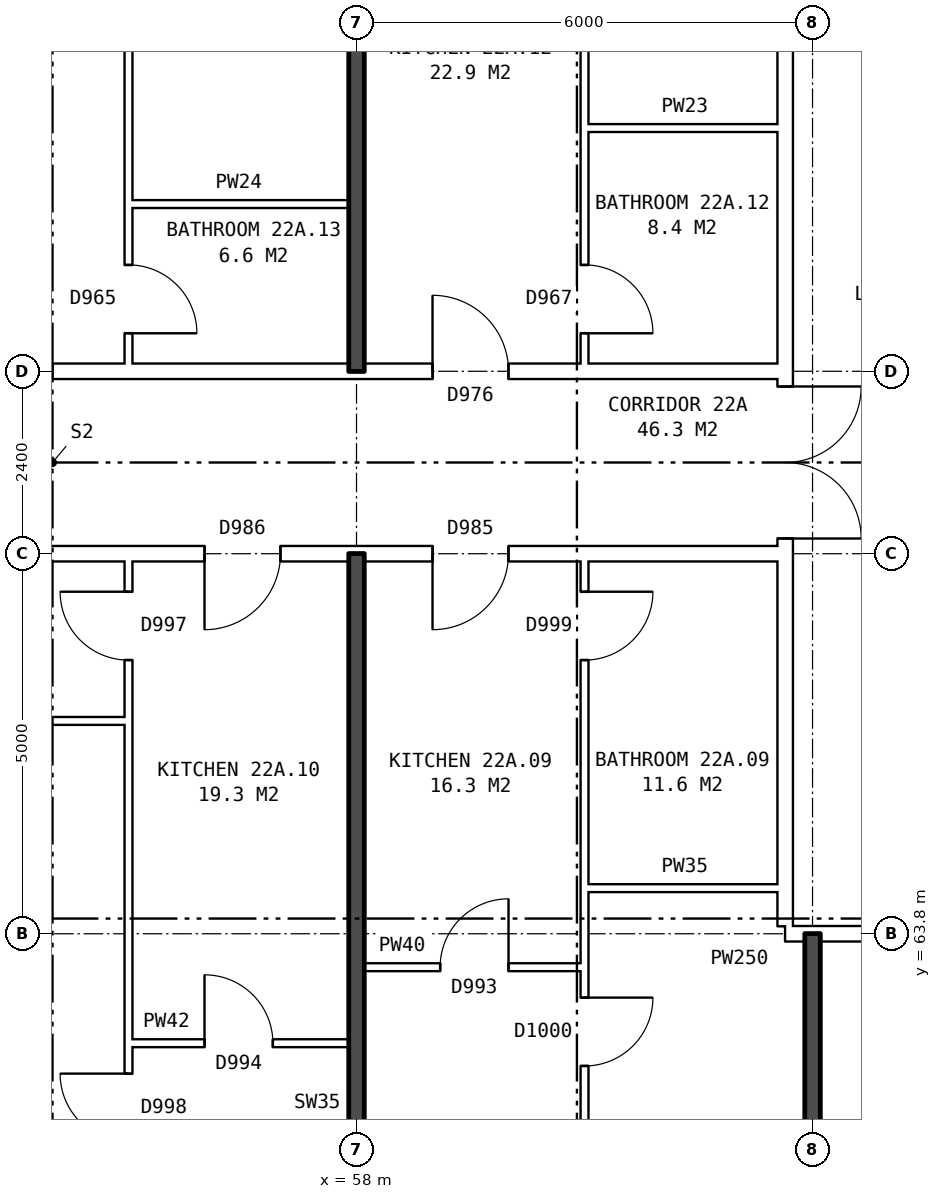
"""IFC4 building model, lengths in metres.
Left out: names, types, materials, properties, quantities, classifications, styles, units other than length and angle.
Written with IfcOpenShell. Run it as: python <this file> out.ifc"""

import sys

from ifc_helpers import new_model, si_unit, direction, frame, frame_2d, origin, place, context, subcontext, project, spatial, rectangle, extrude, element, fill, save


model = new_model("IFC4")
c1 = context("Model", 3, precision=1e-05, world=origin(), true_north=direction((0.0, 1.0)))
c2 = subcontext(c1, "Body", "Model", "MODEL_VIEW")
j1 = project(units=[si_unit("LENGTHUNIT", "METRE"), si_unit("PLANEANGLEUNIT", "RADIAN")], contexts=[c1])
p1 = place(None, origin())
s1 = spatial("IfcSite", under=j1, at=p1, CompositionType="ELEMENT")
p2 = place(p1, origin())
s2 = spatial("IfcBuilding", under=s1, at=p2, CompositionType="ELEMENT")
p3 = place(p2, frame((0.0, 0.0, 80.9)))
s3 = spatial("IfcBuildingStorey", under=s2, at=p3, CompositionType="ELEMENT", Elevation=80.9)
p4 = place(p3, frame((63.64, 63.9, 0.0), z_axis=(0.0, 0.0, 1.0), x_axis=(0.0, 1.0, 0.0)))
e1 = element("IfcWall", 1, at=p4, inside=s3, PredefinedType="PARTITIONING", context=c2, shape_type="SweptSolid", body=[
    extrude(rectangle(XDim=12.2, YDim=0.2, at=frame_2d((6.1, 0.0))), origin(), (0.0, 0.0, 1.0), 2.85),
])
p5 = place(p4, frame((5.1, 0.0, 0.0)))
e2 = element("IfcOpeningElement", 2, at=p5, cuts=e1, PredefinedType="OPENING", context=c2, shape_type="SweptSolid", body=[
    extrude(rectangle(XDim=2.0, YDim=2.1, at=frame_2d((1.0, 1.05))), frame((0.0, 0.11, 0.0), z_axis=(0.0, -1.0, 0.0), x_axis=(1.0, 0.0, 0.0)), (0.0, 0.0, 1.0), 0.22),
])
p6 = place(p3, frame((55.0, 62.36, 0.0), z_axis=(0.0, 0.0, 1.0), x_axis=(1.0, 0.0, 0.0)))
e3 = element("IfcWall", 3, at=p6, inside=s3, PredefinedType="PARTITIONING", context=c2, shape_type="SweptSolid", body=[
    extrude(rectangle(XDim=2.9, YDim=0.1, at=frame_2d((1.45, 0.0))), origin(), (0.0, 0.0, 1.0), 2.85),
])
p7 = place(p6, frame((1.0, 0.0, 0.0)))
e4 = element("IfcOpeningElement", 4, at=p7, cuts=e3, PredefinedType="OPENING", context=c2, shape_type="SweptSolid", body=[
    extrude(rectangle(XDim=0.9, YDim=2.1, at=frame_2d((0.45, 1.05))), frame((0.0, 0.06, 0.0), z_axis=(0.0, -1.0, 0.0), x_axis=(1.0, 0.0, 0.0)), (0.0, 0.0, 1.0), 0.12),
])
p8 = place(p3, frame((58.1, 63.36, 0.0), z_axis=(0.0, 0.0, 1.0), x_axis=(1.0, 0.0, 0.0)))
e5 = element("IfcWall", 5, at=p8, inside=s3, PredefinedType="PARTITIONING", context=c2, shape_type="SweptSolid", body=[
    extrude(rectangle(XDim=2.9, YDim=0.1, at=frame_2d((1.45, 0.0))), origin(), (0.0, 0.0, 1.0), 2.85),
])
p9 = place(p8, frame((1.0, 0.0, 0.0)))
e6 = element("IfcOpeningElement", 6, at=p9, cuts=e5, PredefinedType="OPENING", context=c2, shape_type="SweptSolid", body=[
    extrude(rectangle(XDim=0.9, YDim=2.1, at=frame_2d((0.45, 1.05))), frame((0.0, 0.06, 0.0), z_axis=(0.0, -1.0, 0.0), x_axis=(1.0, 0.0, 0.0)), (0.0, 0.0, 1.0), 0.12),
])
p10 = place(p3, frame((63.64, 63.8, 0.0), z_axis=(0.0, 0.0, 1.0), x_axis=(1.0, 0.0, 0.0)))
e7 = element("IfcWall", 7, at=p10, inside=s3, PredefinedType="PARTITIONING", context=c2, shape_type="SweptSolid", body=[
    extrude(rectangle(XDim=3.0, YDim=0.2, at=frame_2d((1.5, 0.0))), origin(), (0.0, 0.0, 1.0), 2.85),
])
p11 = place(p10, frame((1.18, 0.0, 0.0)))
e8 = element("IfcOpeningElement", 8, at=p11, cuts=e7, PredefinedType="OPENING", context=c2, shape_type="SweptSolid", body=[
    extrude(rectangle(XDim=1.0, YDim=2.1, at=frame_2d((0.5, 1.05))), frame((0.0, 0.11, 0.0), z_axis=(0.0, -1.0, 0.0), x_axis=(1.0, 0.0, 0.0)), (0.0, 0.0, 1.0), 0.22),
])
p12 = place(p3, frame((61.0, 64.4, 0.0), z_axis=(0.0, 0.0, 1.0), x_axis=(1.0, 0.0, 0.0)))
e9 = element("IfcWall", 9, at=p12, inside=s3, PredefinedType="PARTITIONING", context=c2, shape_type="SweptSolid", body=[
    extrude(rectangle(XDim=2.64, YDim=0.1, at=frame_2d((1.32, 0.0))), origin(), (0.0, 0.0, 1.0), 2.85),
])
p13 = place(p3, frame((49.0, 66.6, 0.0), z_axis=(0.0, 0.0, 1.0), x_axis=(1.0, 0.0, 0.0)))
e10 = element("IfcWall", 10, at=p13, inside=s3, PredefinedType="PARTITIONING", context=c2, shape_type="SweptSolid", body=[
    extrude(rectangle(XDim=6.0, YDim=0.1, at=frame_2d((3.0, 0.0))), origin(), (0.0, 0.0, 1.0), 2.85),
])
p14 = place(p3, frame((44.36, 68.8, 0.0), z_axis=(0.0, 0.0, 1.0), x_axis=(1.0, 0.0, 0.0)))
e11 = element("IfcWall", 11, at=p14, inside=s3, PredefinedType="PARTITIONING", context=c2, shape_type="SweptSolid", body=[
    extrude(rectangle(XDim=19.28, YDim=0.2, at=frame_2d((9.64, 0.0))), origin(), (0.0, 0.0, 1.0), 2.85),
])
p15 = place(p14, frame((14.64, 0.0, 0.0)))
e12 = element("IfcOpeningElement", 12, at=p15, cuts=e11, PredefinedType="OPENING", context=c2, shape_type="SweptSolid", body=[
    extrude(rectangle(XDim=1.0, YDim=2.1, at=frame_2d((0.5, 1.05))), frame((0.0, 0.11, 0.0), z_axis=(0.0, -1.0, 0.0), x_axis=(1.0, 0.0, 0.0)), (0.0, 0.0, 1.0), 0.22),
])
p16 = place(p14, frame((11.64, 0.0, 0.0)))
e13 = element("IfcOpeningElement", 13, at=p16, cuts=e11, PredefinedType="OPENING", context=c2, shape_type="SweptSolid", body=[
    extrude(rectangle(XDim=1.0, YDim=2.1, at=frame_2d((0.5, 1.05))), frame((0.0, 0.11, 0.0), z_axis=(0.0, -1.0, 0.0), x_axis=(1.0, 0.0, 0.0)), (0.0, 0.0, 1.0), 0.22),
])
p17 = place(p14, frame((2.64, 0.0, 0.0)))
e14 = element("IfcOpeningElement", 14, at=p17, cuts=e11, PredefinedType="OPENING", context=c2, shape_type="SweptSolid", body=[
    extrude(rectangle(XDim=1.0, YDim=2.1, at=frame_2d((0.5, 1.05))), frame((0.0, 0.11, 0.0), z_axis=(0.0, -1.0, 0.0), x_axis=(1.0, 0.0, 0.0)), (0.0, 0.0, 1.0), 0.22),
])
p18 = place(p3, frame((44.36, 71.2, 0.0), z_axis=(0.0, 0.0, 1.0), x_axis=(1.0, 0.0, 0.0)))
e15 = element("IfcWall", 15, at=p18, inside=s3, PredefinedType="PARTITIONING", context=c2, shape_type="SweptSolid", body=[
    extrude(rectangle(XDim=19.28, YDim=0.2, at=frame_2d((9.64, 0.0))), origin(), (0.0, 0.0, 1.0), 2.85),
])
p19 = place(p18, frame((14.64, 0.0, 0.0)))
e16 = element("IfcOpeningElement", 16, at=p19, cuts=e15, PredefinedType="OPENING", context=c2, shape_type="SweptSolid", body=[
    extrude(rectangle(XDim=1.0, YDim=2.1, at=frame_2d((0.5, 1.05))), frame((0.0, 0.11, 0.0), z_axis=(0.0, -1.0, 0.0), x_axis=(1.0, 0.0, 0.0)), (0.0, 0.0, 1.0), 0.22),
])
p20 = place(p18, frame((8.64, 0.0, 0.0)))
e17 = element("IfcOpeningElement", 17, at=p20, cuts=e15, PredefinedType="OPENING", context=c2, shape_type="SweptSolid", body=[
    extrude(rectangle(XDim=1.0, YDim=2.1, at=frame_2d((0.5, 1.05))), frame((0.0, 0.11, 0.0), z_axis=(0.0, -1.0, 0.0), x_axis=(1.0, 0.0, 0.0)), (0.0, 0.0, 1.0), 0.22),
])
p21 = place(p18, frame((2.64, 0.0, 0.0)))
e18 = element("IfcOpeningElement", 18, at=p21, cuts=e15, PredefinedType="OPENING", context=c2, shape_type="SweptSolid", body=[
    extrude(rectangle(XDim=1.0, YDim=2.1, at=frame_2d((0.5, 1.05))), frame((0.0, 0.11, 0.0), z_axis=(0.0, -1.0, 0.0), x_axis=(1.0, 0.0, 0.0)), (0.0, 0.0, 1.0), 0.22),
])
p22 = place(p3, frame((55.0, 73.4, 0.0), z_axis=(0.0, 0.0, 1.0), x_axis=(1.0, 0.0, 0.0)))
e19 = element("IfcWall", 19, at=p22, inside=s3, PredefinedType="PARTITIONING", context=c2, shape_type="SweptSolid", body=[
    extrude(rectangle(XDim=2.9, YDim=0.1, at=frame_2d((1.45, 0.0))), origin(), (0.0, 0.0, 1.0), 2.85),
])
p23 = place(p3, frame((61.0, 74.4, 0.0), z_axis=(0.0, 0.0, 1.0), x_axis=(1.0, 0.0, 0.0)))
e20 = element("IfcWall", 20, at=p23, inside=s3, PredefinedType="PARTITIONING", context=c2, shape_type="SweptSolid", body=[
    extrude(rectangle(XDim=2.64, YDim=0.1, at=frame_2d((1.32, 0.0))), origin(), (0.0, 0.0, 1.0), 2.85),
])
p24 = place(p3, frame((55.0, 54.36, 0.0), z_axis=(0.0, 0.0, 1.0), x_axis=(0.0, 1.0, 0.0)))
e21 = element("IfcWall", 21, at=p24, inside=s3, PredefinedType="PARTITIONING", context=c2, shape_type="SweptSolid", body=[
    extrude(rectangle(XDim=14.34, YDim=0.1, at=frame_2d((7.17, 0.0))), origin(), (0.0, 0.0, 1.0), 2.85),
])
p25 = place(p24, frame((6.7, 0.0, 0.0)))
e22 = element("IfcOpeningElement", 22, at=p25, cuts=e21, PredefinedType="OPENING", context=c2, shape_type="SweptSolid", body=[
    extrude(rectangle(XDim=0.9, YDim=2.1, at=frame_2d((0.45, 1.05))), frame((0.0, 0.06, 0.0), z_axis=(0.0, -1.0, 0.0), x_axis=(1.0, 0.0, 0.0)), (0.0, 0.0, 1.0), 0.12),
])
p26 = place(p24, frame((13.04, 0.0, 0.0)))
e23 = element("IfcOpeningElement", 23, at=p26, cuts=e21, PredefinedType="OPENING", context=c2, shape_type="SweptSolid", body=[
    extrude(rectangle(XDim=0.9, YDim=2.1, at=frame_2d((0.45, 1.05))), frame((0.0, 0.06, 0.0), z_axis=(0.0, -1.0, 0.0), x_axis=(1.0, 0.0, 0.0)), (0.0, 0.0, 1.0), 0.12),
])
p27 = place(p3, frame((55.0, 71.3, 0.0), z_axis=(0.0, 0.0, 1.0), x_axis=(0.0, 1.0, 0.0)))
e24 = element("IfcWall", 24, at=p27, inside=s3, PredefinedType="PARTITIONING", context=c2, shape_type="SweptSolid", body=[
    extrude(rectangle(XDim=14.34, YDim=0.1, at=frame_2d((7.17, 0.0))), origin(), (0.0, 0.0, 1.0), 2.85),
])
p28 = place(p27, frame((6.74, 0.0, 0.0)))
e25 = element("IfcOpeningElement", 25, at=p28, cuts=e24, PredefinedType="OPENING", context=c2, shape_type="SweptSolid", body=[
    extrude(rectangle(XDim=0.9, YDim=2.1, at=frame_2d((0.45, 1.05))), frame((0.0, 0.06, 0.0), z_axis=(0.0, -1.0, 0.0), x_axis=(1.0, 0.0, 0.0)), (0.0, 0.0, 1.0), 0.12),
])
p29 = place(p27, frame((0.4, 0.0, 0.0)))
e26 = element("IfcOpeningElement", 26, at=p29, cuts=e24, PredefinedType="OPENING", context=c2, shape_type="SweptSolid", body=[
    extrude(rectangle(XDim=0.9, YDim=2.1, at=frame_2d((0.45, 1.05))), frame((0.0, 0.06, 0.0), z_axis=(0.0, -1.0, 0.0), x_axis=(1.0, 0.0, 0.0)), (0.0, 0.0, 1.0), 0.12),
])
for number, where, z_axis, x_axis in (
    (27, (58.0, 54.36, 0.0), (0.0, 0.0, 1.0), (0.0, 1.0, 0.0)),
    (28, (58.0, 71.2, 0.0), (0.0, 0.0, 1.0), (0.0, 1.0, 0.0)),
):
    element("IfcWall", number, at=place(p3, frame(where, z_axis=z_axis, x_axis=x_axis)), inside=s3, PredefinedType="SOLIDWALL", context=c2, shape_type="SweptSolid", body=[
        extrude(rectangle(XDim=14.44, YDim=0.2, at=frame_2d((7.22, 0.0))), origin(), (0.0, 0.0, 1.0), 2.85),
    ])
p30 = place(p3, frame((61.0, 54.36, 0.0), z_axis=(0.0, 0.0, 1.0), x_axis=(0.0, 1.0, 0.0)))
e29 = element("IfcWall", 29, at=p30, inside=s3, PredefinedType="PARTITIONING", context=c2, shape_type="SweptSolid", body=[
    extrude(rectangle(XDim=14.34, YDim=0.1, at=frame_2d((7.17, 0.0))), origin(), (0.0, 0.0, 1.0), 2.85),
])
p31 = place(p30, frame((7.7, 0.0, 0.0)))
e30 = element("IfcOpeningElement", 30, at=p31, cuts=e29, PredefinedType="OPENING", context=c2, shape_type="SweptSolid", body=[
    extrude(rectangle(XDim=0.9, YDim=2.1, at=frame_2d((0.45, 1.05))), frame((0.0, 0.06, 0.0), z_axis=(0.0, -1.0, 0.0), x_axis=(1.0, 0.0, 0.0)), (0.0, 0.0, 1.0), 0.12),
])
p32 = place(p30, frame((13.04, 0.0, 0.0)))
e31 = element("IfcOpeningElement", 31, at=p32, cuts=e29, PredefinedType="OPENING", context=c2, shape_type="SweptSolid", body=[
    extrude(rectangle(XDim=0.9, YDim=2.1, at=frame_2d((0.45, 1.05))), frame((0.0, 0.06, 0.0), z_axis=(0.0, -1.0, 0.0), x_axis=(1.0, 0.0, 0.0)), (0.0, 0.0, 1.0), 0.12),
])
p33 = place(p3, frame((61.0, 71.3, 0.0), z_axis=(0.0, 0.0, 1.0), x_axis=(0.0, 1.0, 0.0)))
e32 = element("IfcWall", 32, at=p33, inside=s3, PredefinedType="PARTITIONING", context=c2, shape_type="SweptSolid", body=[
    extrude(rectangle(XDim=14.34, YDim=0.1, at=frame_2d((7.17, 0.0))), origin(), (0.0, 0.0, 1.0), 2.85),
])
p34 = place(p33, frame((7.94, 0.0, 0.0)))
e33 = element("IfcOpeningElement", 33, at=p34, cuts=e32, PredefinedType="OPENING", context=c2, shape_type="SweptSolid", body=[
    extrude(rectangle(XDim=0.9, YDim=2.1, at=frame_2d((0.45, 1.05))), frame((0.0, 0.06, 0.0), z_axis=(0.0, -1.0, 0.0), x_axis=(1.0, 0.0, 0.0)), (0.0, 0.0, 1.0), 0.12),
])
p35 = place(p33, frame((0.4, 0.0, 0.0)))
e34 = element("IfcOpeningElement", 34, at=p35, cuts=e32, PredefinedType="OPENING", context=c2, shape_type="SweptSolid", body=[
    extrude(rectangle(XDim=0.9, YDim=2.1, at=frame_2d((0.45, 1.05))), frame((0.0, 0.06, 0.0), z_axis=(0.0, -1.0, 0.0), x_axis=(1.0, 0.0, 0.0)), (0.0, 0.0, 1.0), 0.12),
])
p36 = place(p3, frame((64.0, 54.36, 0.0), z_axis=(0.0, 0.0, 1.0), x_axis=(0.0, 1.0, 0.0)))
e35 = element("IfcWall", 35, at=p36, inside=s3, PredefinedType="SOLIDWALL", context=c2, shape_type="SweptSolid", body=[
    extrude(rectangle(XDim=9.44, YDim=0.2, at=frame_2d((4.72, 0.0))), origin(), (0.0, 0.0, 1.0), 2.85),
])
p37 = place(p5, frame((2.0, 0.0, 0.0), z_axis=(0.0, 0.0, 1.0), x_axis=(-1.0, 0.0, 0.0)))
e36 = element("IfcDoor", 36, at=p37, inside=s3, OperationType="DOUBLE_DOOR_SINGLE_SWING", PredefinedType="DOOR", context=c2, shape_type="SweptSolid", body=[
    extrude(rectangle(XDim=2.0, YDim=2.1, at=frame_2d((1.0, 1.05))), frame((0.0, 0.025, 0.0), z_axis=(0.0, -1.0, 0.0), x_axis=(1.0, 0.0, 0.0)), (0.0, 0.0, 1.0), 0.05),
])
fill(e2, e36)
p38 = place(p31, frame((0.9, 0.0, 0.0), z_axis=(0.0, 0.0, 1.0), x_axis=(-1.0, 0.0, 0.0)))
e37 = element("IfcDoor", 37, at=p38, inside=s3, OperationType="SINGLE_SWING_LEFT", PredefinedType="DOOR", context=c2, shape_type="SweptSolid", body=[
    extrude(rectangle(XDim=0.9, YDim=2.1, at=frame_2d((0.45, 1.05))), frame((0.0, 0.025, 0.0), z_axis=(0.0, -1.0, 0.0), x_axis=(1.0, 0.0, 0.0)), (0.0, 0.0, 1.0), 0.05),
])
fill(e30, e37)
p39 = place(p15, frame((1.0, 0.0, 0.0), z_axis=(0.0, 0.0, 1.0), x_axis=(-1.0, 0.0, 0.0)))
e38 = element("IfcDoor", 38, at=p39, inside=s3, OperationType="SINGLE_SWING_RIGHT", PredefinedType="DOOR", context=c2, shape_type="SweptSolid", body=[
    extrude(rectangle(XDim=1.0, YDim=2.1, at=frame_2d((0.5, 1.05))), frame((0.0, 0.025, 0.0), z_axis=(0.0, -1.0, 0.0), x_axis=(1.0, 0.0, 0.0)), (0.0, 0.0, 1.0), 0.05),
])
fill(e12, e38)
p40 = place(p9, origin())
e39 = element("IfcDoor", 39, at=p40, inside=s3, OperationType="SINGLE_SWING_RIGHT", PredefinedType="DOOR", context=c2, shape_type="SweptSolid", body=[
    extrude(rectangle(XDim=0.9, YDim=2.1, at=frame_2d((0.45, 1.05))), frame((0.0, 0.025, 0.0), z_axis=(0.0, -1.0, 0.0), x_axis=(1.0, 0.0, 0.0)), (0.0, 0.0, 1.0), 0.05),
])
fill(e6, e39)
p41 = place(p32, frame((0.9, 0.0, 0.0), z_axis=(0.0, 0.0, 1.0), x_axis=(-1.0, 0.0, 0.0)))
e40 = element("IfcDoor", 40, at=p41, inside=s3, OperationType="SINGLE_SWING_LEFT", PredefinedType="DOOR", context=c2, shape_type="SweptSolid", body=[
    extrude(rectangle(XDim=0.9, YDim=2.1, at=frame_2d((0.45, 1.05))), frame((0.0, 0.025, 0.0), z_axis=(0.0, -1.0, 0.0), x_axis=(1.0, 0.0, 0.0)), (0.0, 0.0, 1.0), 0.05),
])
fill(e31, e40)
p42 = place(p25, origin())
e41 = element("IfcDoor", 41, at=p42, inside=s3, OperationType="SINGLE_SWING_RIGHT", PredefinedType="DOOR", context=c2, shape_type="SweptSolid", body=[
    extrude(rectangle(XDim=0.9, YDim=2.1, at=frame_2d((0.45, 1.05))), frame((0.0, 0.025, 0.0), z_axis=(0.0, -1.0, 0.0), x_axis=(1.0, 0.0, 0.0)), (0.0, 0.0, 1.0), 0.05),
])
fill(e22, e41)
p43 = place(p16, frame((1.0, 0.0, 0.0), z_axis=(0.0, 0.0, 1.0), x_axis=(-1.0, 0.0, 0.0)))
e42 = element("IfcDoor", 42, at=p43, inside=s3, OperationType="SINGLE_SWING_RIGHT", PredefinedType="DOOR", context=c2, shape_type="SweptSolid", body=[
    extrude(rectangle(XDim=1.0, YDim=2.1, at=frame_2d((0.5, 1.05))), frame((0.0, 0.025, 0.0), z_axis=(0.0, -1.0, 0.0), x_axis=(1.0, 0.0, 0.0)), (0.0, 0.0, 1.0), 0.05),
])
fill(e13, e42)
p44 = place(p7, origin())
e43 = element("IfcDoor", 43, at=p44, inside=s3, OperationType="SINGLE_SWING_LEFT", PredefinedType="DOOR", context=c2, shape_type="SweptSolid", body=[
    extrude(rectangle(XDim=0.9, YDim=2.1, at=frame_2d((0.45, 1.05))), frame((0.0, 0.025, 0.0), z_axis=(0.0, -1.0, 0.0), x_axis=(1.0, 0.0, 0.0)), (0.0, 0.0, 1.0), 0.05),
])
fill(e4, e43)
p45 = place(p26, origin())
e44 = element("IfcDoor", 44, at=p45, inside=s3, OperationType="SINGLE_SWING_RIGHT", PredefinedType="DOOR", context=c2, shape_type="SweptSolid", body=[
    extrude(rectangle(XDim=0.9, YDim=2.1, at=frame_2d((0.45, 1.05))), frame((0.0, 0.025, 0.0), z_axis=(0.0, -1.0, 0.0), x_axis=(1.0, 0.0, 0.0)), (0.0, 0.0, 1.0), 0.05),
])
fill(e23, e44)
p46 = place(p19, origin())
e45 = element("IfcDoor", 45, at=p46, inside=s3, OperationType="SINGLE_SWING_LEFT", PredefinedType="DOOR", context=c2, shape_type="SweptSolid", body=[
    extrude(rectangle(XDim=1.0, YDim=2.1, at=frame_2d((0.5, 1.05))), frame((0.0, 0.025, 0.0), z_axis=(0.0, -1.0, 0.0), x_axis=(1.0, 0.0, 0.0)), (0.0, 0.0, 1.0), 0.05),
])
fill(e16, e45)
p47 = place(p35, frame((0.9, 0.0, 0.0), z_axis=(0.0, 0.0, 1.0), x_axis=(-1.0, 0.0, 0.0)))
e46 = element("IfcDoor", 46, at=p47, inside=s3, OperationType="SINGLE_SWING_RIGHT", PredefinedType="DOOR", context=c2, shape_type="SweptSolid", body=[
    extrude(rectangle(XDim=0.9, YDim=2.1, at=frame_2d((0.45, 1.05))), frame((0.0, 0.025, 0.0), z_axis=(0.0, -1.0, 0.0), x_axis=(1.0, 0.0, 0.0)), (0.0, 0.0, 1.0), 0.05),
])
fill(e34, e46)
p48 = place(p29, frame((0.9, 0.0, 0.0), z_axis=(0.0, 0.0, 1.0), x_axis=(-1.0, 0.0, 0.0)))
e47 = element("IfcDoor", 47, at=p48, inside=s3, OperationType="SINGLE_SWING_RIGHT", PredefinedType="DOOR", context=c2, shape_type="SweptSolid", body=[
    extrude(rectangle(XDim=0.9, YDim=2.1, at=frame_2d((0.45, 1.05))), frame((0.0, 0.025, 0.0), z_axis=(0.0, -1.0, 0.0), x_axis=(1.0, 0.0, 0.0)), (0.0, 0.0, 1.0), 0.05),
])
fill(e26, e47)
save(model, sys.argv[1])
